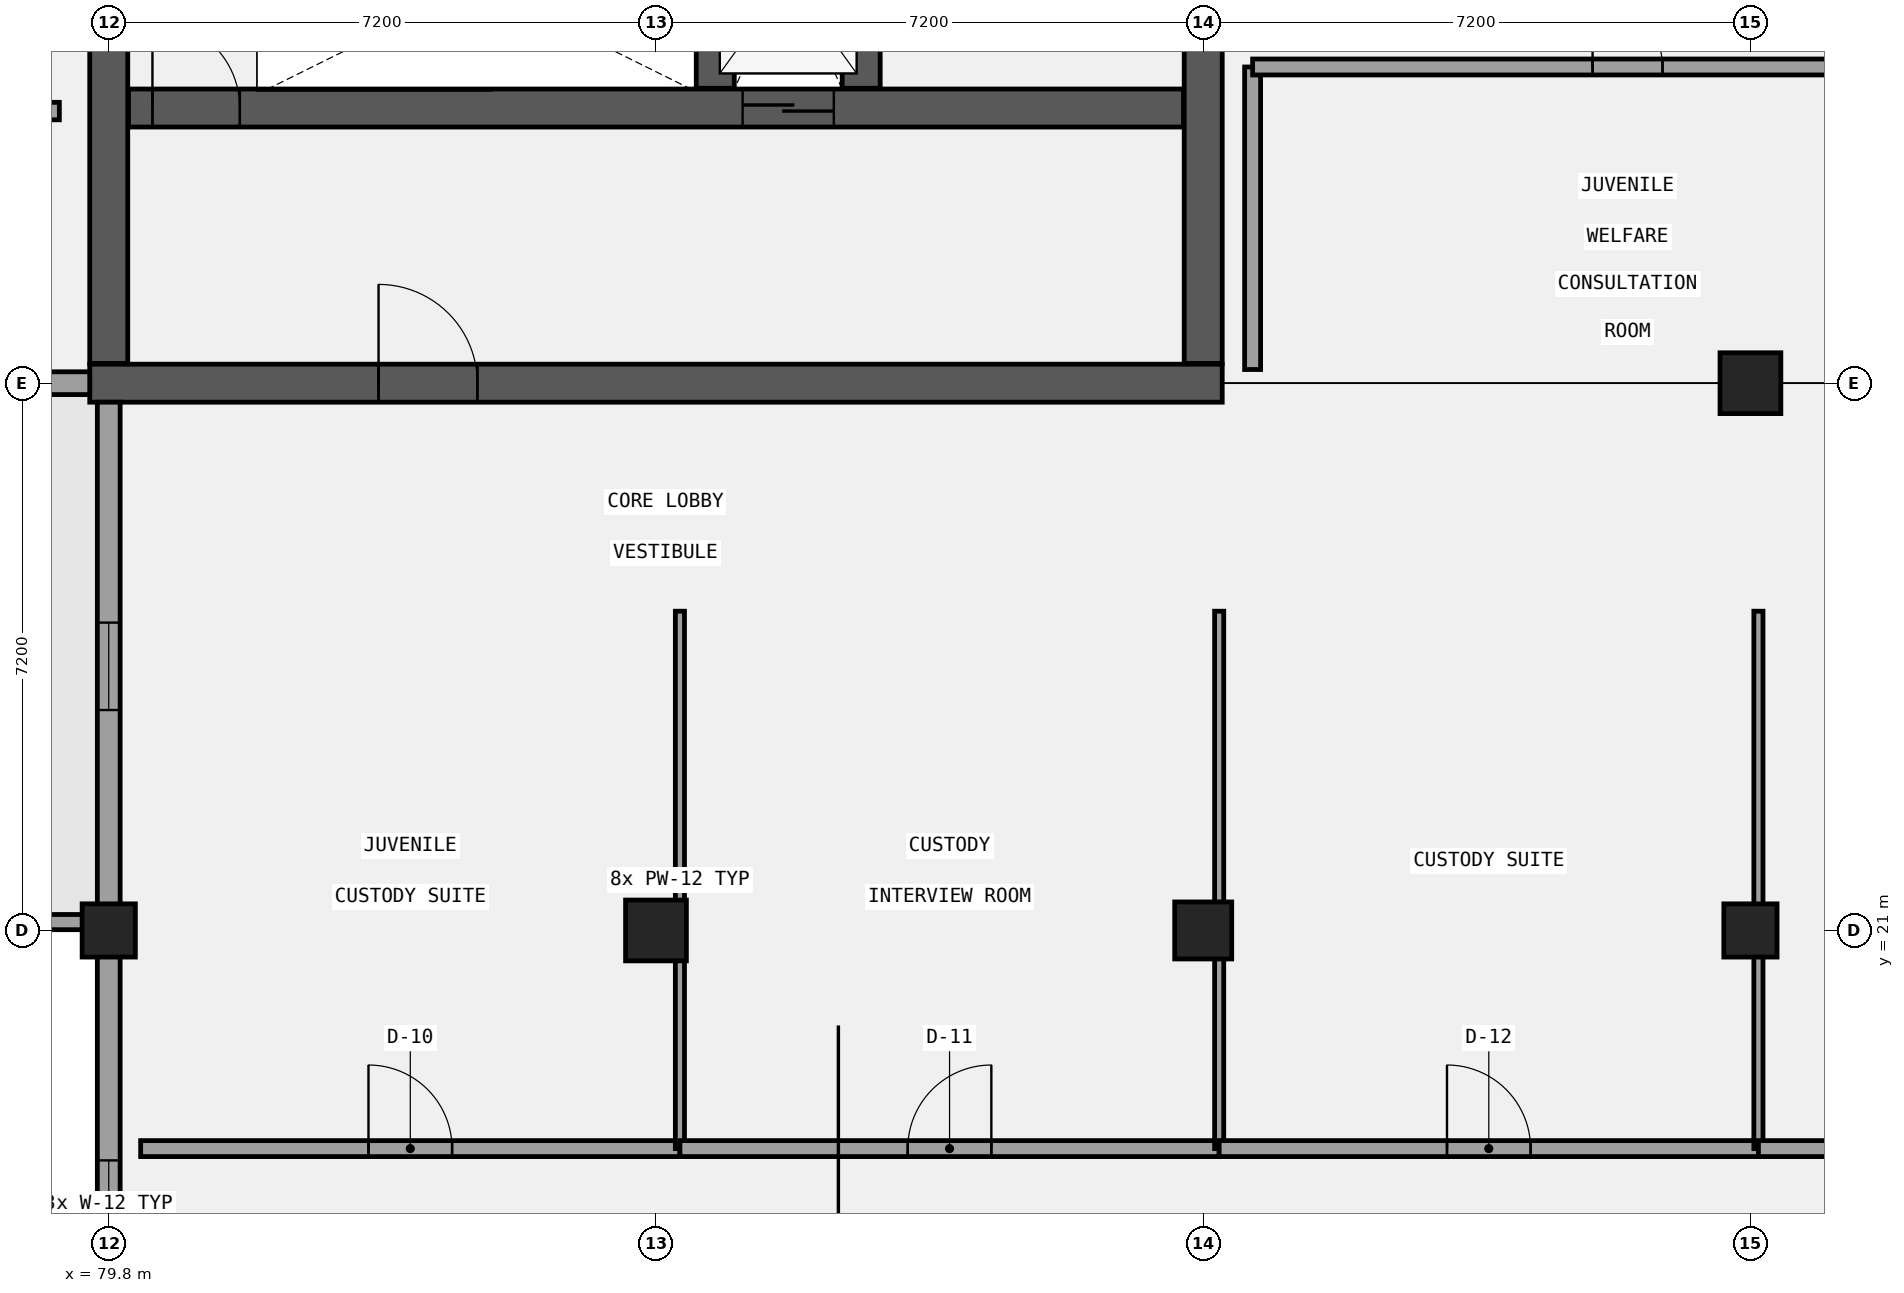
"""IFC4 building model, lengths in metres.
Left out: names, types, materials, properties, quantities, classifications, styles, units other than length and angle.
Written with IfcOpenShell. Run it as: python <this file> out.ifc"""

import sys

from ifc_helpers import new_model, si_unit, direction, frame, frame_2d, origin, origin_2d, place, context, subcontext, project, spatial, rectangle, extrude, element, fill, save


model = new_model("IFC4")
c1 = context("Model", 3, precision=1e-05, world=origin(), true_north=direction((0.0, 1.0)))
c2 = subcontext(c1, "Body", "Model", "MODEL_VIEW")
j1 = project(units=[si_unit("LENGTHUNIT", "METRE"), si_unit("PLANEANGLEUNIT", "RADIAN")], contexts=[c1])
p1 = place(None, origin())
s1 = spatial("IfcSite", under=j1, at=p1, CompositionType="ELEMENT")
p2 = place(p1, origin())
s2 = spatial("IfcBuilding", under=s1, at=p2, CompositionType="ELEMENT")
p3 = place(p2, frame((0.0, 0.0, 5.4)))
s3 = spatial("IfcBuildingStorey", under=s2, at=p3, CompositionType="ELEMENT", Elevation=5.4)
p4 = place(p3, frame((79.55, 28.2, 0.0), z_axis=(0.0, 0.0, 1.0), x_axis=(1.0, 0.0, 0.0)))
e1 = element("IfcWall", 1, at=p4, inside=s3, PredefinedType="SHEAR", context=c2, shape_type="SweptSolid", body=[
    extrude(rectangle(XDim=14.9, YDim=0.5, at=frame_2d((7.45, 0.0))), origin(), (0.0, 0.0, 1.0), 4.2),
])
p5 = place(p4, frame((3.8, 0.0, 0.0)))
e2 = element("IfcOpeningElement", 2, at=p5, cuts=e1, PredefinedType="OPENING", context=c2, shape_type="SweptSolid", body=[
    extrude(rectangle(XDim=1.3, YDim=2.2, at=frame_2d((0.65, 1.1))), frame((0.0, 0.26, 0.0), z_axis=(0.0, -1.0, 0.0), x_axis=(1.0, 0.0, 0.0)), (0.0, 0.0, 1.0), 0.52),
])
for number, where, z_axis, x_axis in (
    (3, (79.8, 28.46, 0.0), (0.0, 0.0, 1.0), (0.0, 1.0, 0.0)),
    (4, (94.2, 28.46, 0.0), (0.0, 0.0, 1.0), (0.0, 1.0, 0.0)),
):
    element("IfcWall", number, at=place(p3, frame(where, z_axis=z_axis, x_axis=x_axis)), inside=s3, PredefinedType="SHEAR", context=c2, shape_type="SweptSolid", body=[
        extrude(rectangle(XDim=6.68, YDim=0.5, at=frame_2d((3.34, 0.0))), origin(), (0.0, 0.0, 1.0), 4.2),
    ])
p6 = place(p3, frame((80.06, 31.82, 0.0), z_axis=(0.0, 0.0, 1.0), x_axis=(1.0, 0.0, 0.0)))
e5 = element("IfcWall", 5, at=p6, inside=s3, PredefinedType="SHEAR", context=c2, shape_type="SweptSolid", body=[
    extrude(rectangle(XDim=13.88, YDim=0.5, at=frame_2d((6.94, 0.0))), origin(), (0.0, 0.0, 1.0), 4.2),
])
p7 = place(p6, frame((8.08, 0.0, 0.0)))
e6 = element("IfcOpeningElement", 6, at=p7, cuts=e5, PredefinedType="OPENING", context=c2, shape_type="SweptSolid", body=[
    extrude(rectangle(XDim=1.2, YDim=2.15, at=frame_2d((0.6, 1.075))), frame((0.0, 0.26, 0.0), z_axis=(0.0, -1.0, 0.0), x_axis=(1.0, 0.0, 0.0)), (0.0, 0.0, 1.0), 0.52),
])
p8 = place(p6, frame((0.315, 0.0, 0.0)))
e7 = element("IfcOpeningElement", 7, at=p8, cuts=e5, PredefinedType="OPENING", context=c2, shape_type="SweptSolid", body=[
    extrude(rectangle(XDim=1.15, YDim=2.15, at=frame_2d((0.575, 1.075))), frame((0.0, 0.26, 0.0), z_axis=(0.0, -1.0, 0.0), x_axis=(1.0, 0.0, 0.0)), (0.0, 0.0, 1.0), 0.52),
])
for number, where, z_axis, x_axis in (
    (8, (87.78, 32.08, 0.0), (0.0, 0.0, 1.0), (0.0, 1.0, 0.0)),
    (9, (89.7, 32.08, 0.0), (0.0, 0.0, 1.0), (0.0, 1.0, 0.0)),
):
    element("IfcWall", number, at=place(p3, frame(where, z_axis=z_axis, x_axis=x_axis)), inside=s3, PredefinedType="SHEAR", context=c2, shape_type="SweptSolid", body=[
        extrude(rectangle(XDim=3.06, YDim=0.5, at=frame_2d((1.53, 0.0))), origin(), (0.0, 0.0, 1.0), 4.2),
    ])
p9 = place(p3, frame((79.8, 21.0, 0.0), z_axis=(0.0, 0.0, 1.0), x_axis=(1.0, 0.0, 0.0)))
e10 = element("IfcColumn", 10, at=p9, inside=s3, PredefinedType="COLUMN", context=c2, shape_type="SweptSolid", body=[
    extrude(rectangle(XDim=0.7, YDim=0.7, at=origin_2d()), origin(), (0.0, 0.0, 1.0), 4.2),
])
p10 = place(p3, frame((87.0, 21.0, 0.0), z_axis=(0.0, 0.0, 1.0), x_axis=(1.0, 0.0, 0.0)))
e11 = element("IfcColumn", 11, at=p10, inside=s3, PredefinedType="COLUMN", context=c2, shape_type="SweptSolid", body=[
    extrude(rectangle(XDim=0.8, YDim=0.8, at=origin_2d()), origin(), (0.0, 0.0, 1.0), 4.2),
])
p11 = place(p3, frame((94.2, 21.0, 0.0), z_axis=(0.0, 0.0, 1.0), x_axis=(1.0, 0.0, 0.0)))
e12 = element("IfcColumn", 12, at=p11, inside=s3, PredefinedType="COLUMN", context=c2, shape_type="SweptSolid", body=[
    extrude(rectangle(XDim=0.75, YDim=0.75, at=origin_2d()), origin(), (0.0, 0.0, 1.0), 4.2),
])
p12 = place(p3, frame((101.4, 21.0, 0.0), z_axis=(0.0, 0.0, 1.0), x_axis=(1.0, 0.0, 0.0)))
e13 = element("IfcColumn", 13, at=p12, inside=s3, PredefinedType="COLUMN", context=c2, shape_type="SweptSolid", body=[
    extrude(rectangle(XDim=0.7, YDim=0.7, at=origin_2d()), origin(), (0.0, 0.0, 1.0), 4.2),
])
p13 = place(p3, frame((101.4, 28.2, 0.0), z_axis=(0.0, 0.0, 1.0), x_axis=(1.0, 0.0, 0.0)))
e14 = element("IfcColumn", 14, at=p13, inside=s3, PredefinedType="COLUMN", context=c2, shape_type="SweptSolid", body=[
    extrude(rectangle(XDim=0.8, YDim=0.8, at=origin_2d()), origin(), (0.0, 0.0, 1.0), 4.2),
])
p14 = place(p3, frame((79.8, 27.95, 0.0), z_axis=(0.0, 0.0, 1.0), x_axis=(0.0, -1.0, 0.0)))
e15 = element("IfcWall", 15, at=p14, inside=s3, PredefinedType="SOLIDWALL", context=c2, shape_type="SweptSolid", body=[
    extrude(rectangle(XDim=21.2, YDim=0.3, at=frame_2d((10.6, 0.0))), origin(), (0.0, 0.0, 1.0), 3.27),
])
p15 = place(p14, frame((17.1, 0.0, 1.0)))
e16 = element("IfcOpeningElement", 16, at=p15, cuts=e15, PredefinedType="OPENING", context=c2, shape_type="SweptSolid", body=[
    extrude(rectangle(XDim=1.15, YDim=1.65, at=frame_2d((0.575, 0.825))), frame((0.0, 0.16, 0.0), z_axis=(0.0, -1.0, 0.0), x_axis=(1.0, 0.0, 0.0)), (0.0, 0.0, 1.0), 0.32),
])
p16 = place(p14, frame((9.975, 0.0, 1.0)))
e17 = element("IfcOpeningElement", 17, at=p16, cuts=e15, PredefinedType="OPENING", context=c2, shape_type="SweptSolid", body=[
    extrude(rectangle(XDim=1.15, YDim=1.65, at=frame_2d((0.575, 0.825))), frame((0.0, 0.16, 0.0), z_axis=(0.0, -1.0, 0.0), x_axis=(1.0, 0.0, 0.0)), (0.0, 0.0, 1.0), 0.32),
])
p17 = place(p14, frame((2.9, 0.0, 1.0)))
e18 = element("IfcOpeningElement", 18, at=p17, cuts=e15, PredefinedType="OPENING", context=c2, shape_type="SweptSolid", body=[
    extrude(rectangle(XDim=1.15, YDim=1.65, at=frame_2d((0.575, 0.825))), frame((0.0, 0.16, 0.0), z_axis=(0.0, -1.0, 0.0), x_axis=(1.0, 0.0, 0.0)), (0.0, 0.0, 1.0), 0.32),
])
p18 = place(p3, frame((29.25, 28.2, 0.0), z_axis=(0.0, 0.0, 1.0), x_axis=(1.0, 0.0, 0.0)))
e19 = element("IfcWall", 19, at=p18, inside=s3, PredefinedType="SOLIDWALL", context=c2, shape_type="SweptSolid", body=[
    extrude(rectangle(XDim=50.3, YDim=0.3, at=frame_2d((25.15, 0.0))), origin(), (0.0, 0.0, 1.0), 2.92),
])
p19 = place(p18, frame((3.025, 0.0, 1.0)))
e20 = element("IfcOpeningElement", 20, at=p19, cuts=e19, PredefinedType="OPENING", context=c2, shape_type="SweptSolid", body=[
    extrude(rectangle(XDim=1.45, YDim=1.65, at=frame_2d((0.725, 0.825))), frame((0.0, 0.16, 0.0), z_axis=(0.0, -1.0, 0.0), x_axis=(1.0, 0.0, 0.0)), (0.0, 0.0, 1.0), 0.32),
])
p20 = place(p18, frame((10.225, 0.0, 1.0)))
e21 = element("IfcOpeningElement", 21, at=p20, cuts=e19, PredefinedType="OPENING", context=c2, shape_type="SweptSolid", body=[
    extrude(rectangle(XDim=1.45, YDim=1.65, at=frame_2d((0.725, 0.825))), frame((0.0, 0.16, 0.0), z_axis=(0.0, -1.0, 0.0), x_axis=(1.0, 0.0, 0.0)), (0.0, 0.0, 1.0), 0.32),
])
p21 = place(p18, frame((17.425, 0.0, 1.0)))
e22 = element("IfcOpeningElement", 22, at=p21, cuts=e19, PredefinedType="OPENING", context=c2, shape_type="SweptSolid", body=[
    extrude(rectangle(XDim=1.45, YDim=1.65, at=frame_2d((0.725, 0.825))), frame((0.0, 0.16, 0.0), z_axis=(0.0, -1.0, 0.0), x_axis=(1.0, 0.0, 0.0)), (0.0, 0.0, 1.0), 0.32),
])
p22 = place(p18, frame((24.625, 0.0, 1.0)))
e23 = element("IfcOpeningElement", 23, at=p22, cuts=e19, PredefinedType="OPENING", context=c2, shape_type="SweptSolid", body=[
    extrude(rectangle(XDim=1.45, YDim=1.65, at=frame_2d((0.725, 0.825))), frame((0.0, 0.16, 0.0), z_axis=(0.0, -1.0, 0.0), x_axis=(1.0, 0.0, 0.0)), (0.0, 0.0, 1.0), 0.32),
])
p23 = place(p18, frame((31.825, 0.0, 1.0)))
e24 = element("IfcOpeningElement", 24, at=p23, cuts=e19, PredefinedType="OPENING", context=c2, shape_type="SweptSolid", body=[
    extrude(rectangle(XDim=1.45, YDim=1.65, at=frame_2d((0.725, 0.825))), frame((0.0, 0.16, 0.0), z_axis=(0.0, -1.0, 0.0), x_axis=(1.0, 0.0, 0.0)), (0.0, 0.0, 1.0), 0.32),
])
p24 = place(p18, frame((39.025, 0.0, 1.0)))
e25 = element("IfcOpeningElement", 25, at=p24, cuts=e19, PredefinedType="OPENING", context=c2, shape_type="SweptSolid", body=[
    extrude(rectangle(XDim=1.45, YDim=1.65, at=frame_2d((0.725, 0.825))), frame((0.0, 0.16, 0.0), z_axis=(0.0, -1.0, 0.0), x_axis=(1.0, 0.0, 0.0)), (0.0, 0.0, 1.0), 0.32),
])
p25 = place(p18, frame((46.1, 0.0, 1.0)))
e26 = element("IfcOpeningElement", 26, at=p25, cuts=e19, PredefinedType="OPENING", context=c2, shape_type="SweptSolid", body=[
    extrude(rectangle(XDim=1.45, YDim=1.65, at=frame_2d((0.725, 0.825))), frame((0.0, 0.16, 0.0), z_axis=(0.0, -1.0, 0.0), x_axis=(1.0, 0.0, 0.0)), (0.0, 0.0, 1.0), 0.32),
])
p26 = place(p3, frame((79.58, 21.11, 0.0), z_axis=(0.0, 0.0, 1.0), x_axis=(-1.0, 0.0, 0.0)))
e27 = element("IfcWall", 27, at=p26, inside=s3, PredefinedType="PARAPET", context=c2, shape_type="SweptSolid", body=[
    extrude(rectangle(XDim=49.96, YDim=0.2, at=frame_2d((24.98, 0.0))), origin(), (0.0, 0.0, 1.0), 1.12),
])
p27 = place(p3, frame((94.85, 28.38, 0.0), z_axis=(0.0, 0.0, 1.0), x_axis=(0.0, 1.0, 0.0)))
e28 = element("IfcWall", 28, at=p27, inside=s3, PredefinedType="PARTITIONING", context=c2, shape_type="SweptSolid", body=[
    extrude(rectangle(XDim=3.98, YDim=0.21, at=frame_2d((1.99, 0.0))), origin(), (0.0, 0.0, 1.0), 3.92),
])
p28 = place(p3, frame((94.85, 32.36, 0.0), z_axis=(0.0, 0.0, 1.0), x_axis=(1.0, 0.0, 0.0)))
e29 = element("IfcWall", 29, at=p28, inside=s3, PredefinedType="PARTITIONING", context=c2, shape_type="SweptSolid", body=[
    extrude(rectangle(XDim=9.866, YDim=0.21, at=frame_2d((4.933, 0.0))), origin(), (0.0, 0.0, 1.0), 3.92),
])
p29 = place(p28, frame((4.473, 0.0, 0.0)))
e30 = element("IfcOpeningElement", 30, at=p29, cuts=e29, PredefinedType="OPENING", context=c2, shape_type="SweptSolid", body=[
    extrude(rectangle(XDim=0.92, YDim=2.22, at=frame_2d((0.46, 1.11))), frame((0.0, 0.115, 0.0), z_axis=(0.0, -1.0, 0.0), x_axis=(1.0, 0.0, 0.0)), (0.0, 0.0, 1.0), 0.23),
])
p30 = place(p3, frame((70.734, 31.78, 0.0), z_axis=(0.0, 0.0, 1.0), x_axis=(1.0, 0.0, 0.0)))
e31 = element("IfcWall", 31, at=p30, inside=s3, PredefinedType="PARTITIONING", context=c2, shape_type="SweptSolid", body=[
    extrude(rectangle(XDim=8.416, YDim=0.23, at=frame_2d((4.208, 0.0))), origin(), (0.0, 0.0, 1.0), 3.37),
])
p31 = place(p30, frame((3.658, 0.0, 0.0)))
e32 = element("IfcOpeningElement", 32, at=p31, cuts=e31, PredefinedType="OPENING", context=c2, shape_type="SweptSolid", body=[
    extrude(rectangle(XDim=1.1, YDim=2.22, at=frame_2d((0.55, 1.11))), frame((0.0, 0.125, 0.0), z_axis=(0.0, -1.0, 0.0), x_axis=(1.0, 0.0, 0.0)), (0.0, 0.0, 1.0), 0.25),
])
p32 = place(p3, frame((80.22, 18.13, 0.0), z_axis=(0.0, 0.0, 1.0), x_axis=(1.0, 0.0, 0.0)))
e33 = element("IfcWall", 33, at=p32, inside=s3, PredefinedType="PARTITIONING", context=c2, shape_type="SweptSolid", body=[
    extrude(rectangle(XDim=7.095, YDim=0.21, at=frame_2d((3.547, 0.0))), origin(), (0.0, 0.0, 1.0), 3.92),
])
p33 = place(p32, frame((2.998, 0.0, 0.0)))
e34 = element("IfcOpeningElement", 34, at=p33, cuts=e33, PredefinedType="OPENING", context=c2, shape_type="SweptSolid", body=[
    extrude(rectangle(XDim=1.1, YDim=2.1, at=frame_2d((0.55, 1.05))), frame((0.0, 0.115, 0.0), z_axis=(0.0, -1.0, 0.0), x_axis=(1.0, 0.0, 0.0)), (0.0, 0.0, 1.0), 0.23),
])
p34 = place(p3, frame((87.315, 18.13, 0.0), z_axis=(0.0, 0.0, 1.0), x_axis=(0.0, 1.0, 0.0)))
e35 = element("IfcWall", 35, at=p34, inside=s3, PredefinedType="PARTITIONING", context=c2, shape_type="SweptSolid", body=[
    extrude(rectangle(XDim=7.07, YDim=0.12, at=frame_2d((3.535, 0.0))), origin(), (0.0, 0.0, 1.0), 3.92),
])
p35 = place(p3, frame((87.315, 18.13, 0.0), z_axis=(0.0, 0.0, 1.0), x_axis=(1.0, 0.0, 0.0)))
e36 = element("IfcWall", 36, at=p35, inside=s3, PredefinedType="PARTITIONING", context=c2, shape_type="SweptSolid", body=[
    extrude(rectangle(XDim=7.095, YDim=0.21, at=frame_2d((3.547, 0.0))), origin(), (0.0, 0.0, 1.0), 3.92),
])
p36 = place(p35, frame((2.998, 0.0, 0.0)))
e37 = element("IfcOpeningElement", 37, at=p36, cuts=e36, PredefinedType="OPENING", context=c2, shape_type="SweptSolid", body=[
    extrude(rectangle(XDim=1.1, YDim=2.22, at=frame_2d((0.55, 1.11))), frame((0.0, 0.115, 0.0), z_axis=(0.0, -1.0, 0.0), x_axis=(1.0, 0.0, 0.0)), (0.0, 0.0, 1.0), 0.23),
])
p37 = place(p3, frame((94.41, 18.13, 0.0), z_axis=(0.0, 0.0, 1.0), x_axis=(0.0, 1.0, 0.0)))
e38 = element("IfcWall", 38, at=p37, inside=s3, PredefinedType="PARTITIONING", context=c2, shape_type="SweptSolid", body=[
    extrude(rectangle(XDim=7.07, YDim=0.12, at=frame_2d((3.535, 0.0))), origin(), (0.0, 0.0, 1.0), 3.17),
])
p38 = place(p3, frame((94.41, 18.13, 0.0), z_axis=(0.0, 0.0, 1.0), x_axis=(1.0, 0.0, 0.0)))
e39 = element("IfcWall", 39, at=p38, inside=s3, PredefinedType="PARTITIONING", context=c2, shape_type="SweptSolid", body=[
    extrude(rectangle(XDim=7.095, YDim=0.21, at=frame_2d((3.547, 0.0))), origin(), (0.0, 0.0, 1.0), 3.92),
])
p39 = place(p38, frame((2.998, 0.0, 0.0)))
e40 = element("IfcOpeningElement", 40, at=p39, cuts=e39, PredefinedType="OPENING", context=c2, shape_type="SweptSolid", body=[
    extrude(rectangle(XDim=1.1, YDim=2.35, at=frame_2d((0.55, 1.175))), frame((0.0, 0.115, 0.0), z_axis=(0.0, -1.0, 0.0), x_axis=(1.0, 0.0, 0.0)), (0.0, 0.0, 1.0), 0.23),
])
p40 = place(p3, frame((101.505, 18.13, 0.0), z_axis=(0.0, 0.0, 1.0), x_axis=(0.0, 1.0, 0.0)))
e41 = element("IfcWall", 41, at=p40, inside=s3, PredefinedType="PARTITIONING", context=c2, shape_type="SweptSolid", body=[
    extrude(rectangle(XDim=7.07, YDim=0.12, at=frame_2d((3.535, 0.0))), origin(), (0.0, 0.0, 1.0), 3.12),
])
p41 = place(p3, frame((101.505, 18.13, 0.0), z_axis=(0.0, 0.0, 1.0), x_axis=(1.0, 0.0, 0.0)))
e42 = element("IfcWall", 42, at=p41, inside=s3, PredefinedType="PARTITIONING", context=c2, shape_type="SweptSolid", body=[
    extrude(rectangle(XDim=7.095, YDim=0.21, at=frame_2d((3.548, 0.0))), origin(), (0.0, 0.0, 1.0), 3.92),
])
p42 = place(p41, frame((3.048, 0.0, 0.0)))
e43 = element("IfcOpeningElement", 43, at=p42, cuts=e42, PredefinedType="OPENING", context=c2, shape_type="SweptSolid", body=[
    extrude(rectangle(XDim=1.0, YDim=2.15, at=frame_2d((0.5, 1.075))), frame((0.0, 0.115, 0.0), z_axis=(0.0, -1.0, 0.0), x_axis=(1.0, 0.0, 0.0)), (0.0, 0.0, 1.0), 0.23),
])
p43 = place(p7, frame((1.2, 0.0, 0.0), z_axis=(0.0, 0.0, 1.0), x_axis=(-1.0, 0.0, 0.0)))
e44 = element("IfcDoor", 44, at=p43, inside=s3, OperationType="DOUBLE_DOOR_SLIDING", PredefinedType="DOOR", context=c2, shape_type="SweptSolid", body=[
    extrude(rectangle(XDim=1.2, YDim=2.15, at=frame_2d((0.6, 1.075))), frame((0.0, 0.025, 0.0), z_axis=(0.0, -1.0, 0.0), x_axis=(1.0, 0.0, 0.0)), (0.0, 0.0, 1.0), 0.05),
])
fill(e6, e44)
p44 = place(p8, origin())
e45 = element("IfcDoor", 45, at=p44, inside=s3, OperationType="SINGLE_SWING_LEFT", PredefinedType="DOOR", context=c2, shape_type="SweptSolid", body=[
    extrude(rectangle(XDim=1.15, YDim=2.15, at=frame_2d((0.575, 1.075))), frame((0.0, 0.025, 0.0), z_axis=(0.0, -1.0, 0.0), x_axis=(1.0, 0.0, 0.0)), (0.0, 0.0, 1.0), 0.05),
])
fill(e7, e45)
p45 = place(p5, frame((1.3, 0.0, 0.0), z_axis=(0.0, 0.0, 1.0), x_axis=(-1.0, 0.0, 0.0)))
e46 = element("IfcDoor", 46, at=p45, inside=s3, OperationType="SINGLE_SWING_LEFT", PredefinedType="DOOR", context=c2, shape_type="SweptSolid", body=[
    extrude(rectangle(XDim=1.3, YDim=2.2, at=frame_2d((0.65, 1.1))), frame((0.0, 0.025, 0.0), z_axis=(0.0, -1.0, 0.0), x_axis=(1.0, 0.0, 0.0)), (0.0, 0.0, 1.0), 0.05),
])
fill(e2, e46)
p46 = place(p16, origin())
e47 = element("IfcWindow", 47, at=p46, inside=s3, PartitioningType="SINGLE_PANEL", PredefinedType="WINDOW", context=c2, shape_type="SweptSolid", body=[
    extrude(rectangle(XDim=1.15, YDim=1.65, at=frame_2d((0.575, 0.825))), frame((0.0, 0.03, 0.0), z_axis=(0.0, -1.0, 0.0), x_axis=(1.0, 0.0, 0.0)), (0.0, 0.0, 1.0), 0.06),
])
fill(e17, e47)
p47 = place(p17, origin())
e48 = element("IfcWindow", 48, at=p47, inside=s3, PartitioningType="SINGLE_PANEL", PredefinedType="WINDOW", context=c2, shape_type="SweptSolid", body=[
    extrude(rectangle(XDim=1.15, YDim=1.65, at=frame_2d((0.575, 0.825))), frame((0.0, 0.03, 0.0), z_axis=(0.0, -1.0, 0.0), x_axis=(1.0, 0.0, 0.0)), (0.0, 0.0, 1.0), 0.06),
])
fill(e18, e48)
p48 = place(p29, frame((0.92, 0.0, 0.0), z_axis=(0.0, 0.0, 1.0), x_axis=(-1.0, 0.0, 0.0)))
e49 = element("IfcDoor", 49, at=p48, inside=s3, OperationType="SINGLE_SWING_LEFT", PredefinedType="DOOR", context=c2, shape_type="SweptSolid", body=[
    extrude(rectangle(XDim=0.92, YDim=2.22, at=frame_2d((0.46, 1.11))), frame((0.0, 0.025, 0.0), z_axis=(0.0, -1.0, 0.0), x_axis=(1.0, 0.0, 0.0)), (0.0, 0.0, 1.0), 0.05),
])
fill(e30, e49)
p49 = place(p33, origin())
e50 = element("IfcDoor", 50, at=p49, inside=s3, OperationType="SINGLE_SWING_LEFT", PredefinedType="DOOR", context=c2, shape_type="SweptSolid", body=[
    extrude(rectangle(XDim=1.1, YDim=2.1, at=frame_2d((0.55, 1.05))), frame((0.0, 0.025, 0.0), z_axis=(0.0, -1.0, 0.0), x_axis=(1.0, 0.0, 0.0)), (0.0, 0.0, 1.0), 0.05),
])
fill(e34, e50)
p50 = place(p36, origin())
e51 = element("IfcDoor", 51, at=p50, inside=s3, OperationType="SINGLE_SWING_RIGHT", PredefinedType="DOOR", context=c2, shape_type="SweptSolid", body=[
    extrude(rectangle(XDim=1.1, YDim=2.22, at=frame_2d((0.55, 1.11))), frame((0.0, 0.025, 0.0), z_axis=(0.0, -1.0, 0.0), x_axis=(1.0, 0.0, 0.0)), (0.0, 0.0, 1.0), 0.05),
])
fill(e37, e51)
p51 = place(p39, origin())
e52 = element("IfcDoor", 52, at=p51, inside=s3, OperationType="SINGLE_SWING_LEFT", PredefinedType="DOOR", context=c2, shape_type="SweptSolid", body=[
    extrude(rectangle(XDim=1.1, YDim=2.35, at=frame_2d((0.55, 1.175))), frame((0.0, 0.025, 0.0), z_axis=(0.0, -1.0, 0.0), x_axis=(1.0, 0.0, 0.0)), (0.0, 0.0, 1.0), 0.05),
])
fill(e40, e52)
save(model, sys.argv[1])
